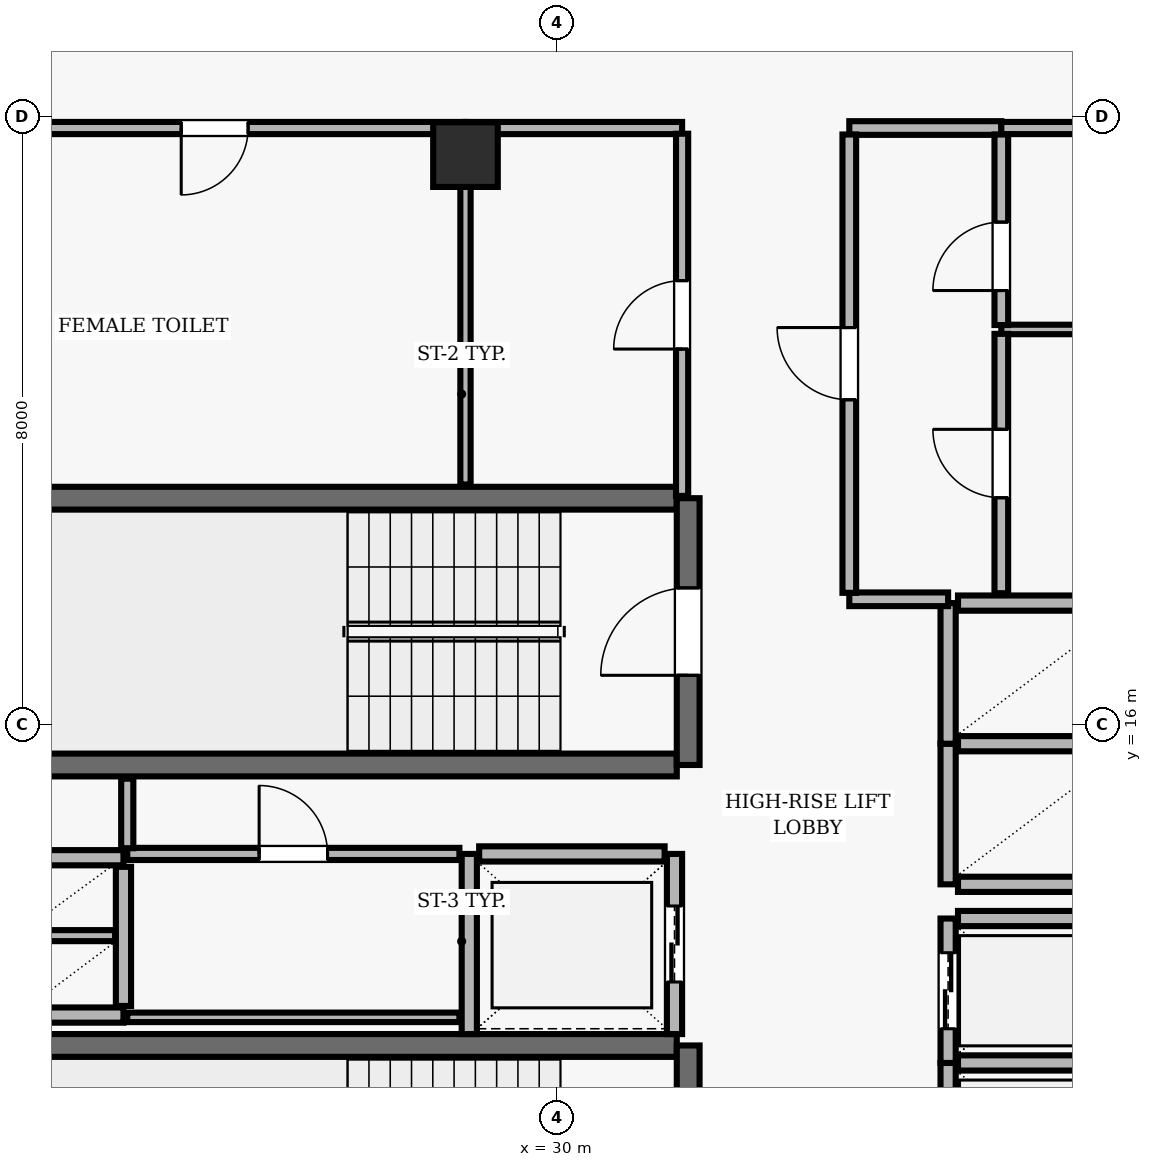
"""IFC4 building model, lengths in metres.
Left out: names, types, materials, properties, quantities, classifications, styles, units other than length and angle.
Written with IfcOpenShell. Run it as: python <this file> out.ifc"""

import sys

from ifc_helpers import new_model, si_unit, direction, frame, frame_2d, origin, origin_2d, place, context, subcontext, project, spatial, rectangle, extrude, element, fill, save


model = new_model("IFC4")
c1 = context("Model", 3, precision=1e-05, world=origin(), true_north=direction((0.0, 1.0)))
c2 = subcontext(c1, "Body", "Model", "MODEL_VIEW")
j1 = project(units=[si_unit("LENGTHUNIT", "METRE"), si_unit("PLANEANGLEUNIT", "RADIAN")], contexts=[c1])
p1 = place(None, origin())
s1 = spatial("IfcSite", under=j1, at=p1, CompositionType="ELEMENT")
p2 = place(p1, origin())
s2 = spatial("IfcBuilding", under=s1, at=p2, CompositionType="ELEMENT")
p3 = place(p2, frame((0.0, 0.0, 298.9)))
s3 = spatial("IfcBuildingStorey", under=s2, at=p3, CompositionType="ELEMENT", Elevation=298.9)
p4 = place(p3, frame((28.8, 23.5, 0.0), z_axis=(0.0, 0.0, 1.0), x_axis=(1.0, 0.0, 0.0)))
e1 = element("IfcColumn", 1, at=p4, inside=s3, PredefinedType="COLUMN", context=c2, shape_type="SweptSolid", body=[
    extrude(rectangle(XDim=0.85, YDim=0.85, at=origin_2d()), origin(), (0.0, 0.0, 1.0), 3.9),
])
for number, where, z_axis, x_axis in (
    (2, (31.58, 18.98, 0.0), (0.0, 0.0, 1.0), (-1.0, 0.0, 0.0)),
    (3, (23.22, 15.47, 0.0), (0.0, 0.0, 1.0), (1.0, 0.0, 0.0)),
):
    element("IfcWall", number, at=place(p3, frame(where, z_axis=z_axis, x_axis=x_axis)), inside=s3, PredefinedType="SHEAR", context=c2, shape_type="SweptSolid", body=[
        extrude(rectangle(XDim=8.36, YDim=0.3, at=frame_2d((4.18, 0.0))), origin(), (0.0, 0.0, 1.0), 3.69),
    ])
p5 = place(p3, frame((31.73, 15.47, 0.0), z_axis=(0.0, 0.0, 1.0), x_axis=(0.0, 1.0, 0.0)))
e4 = element("IfcWall", 4, at=p5, inside=s3, PredefinedType="SHEAR", context=c2, shape_type="SweptSolid", body=[
    extrude(rectangle(XDim=3.51, YDim=0.3, at=frame_2d((1.755, 0.0))), origin(), (0.0, 0.0, 1.0), 3.69),
])
p6 = place(p5, frame((1.18, 0.0, 0.0)))
e5 = element("IfcOpeningElement", 5, at=p6, cuts=e4, PredefinedType="OPENING", context=c2, shape_type="SweptSolid", body=[
    extrude(rectangle(XDim=1.15, YDim=2.15, at=frame_2d((0.575, 1.075))), frame((0.0, 0.16, 0.0), z_axis=(0.0, -1.0, 0.0), x_axis=(1.0, 0.0, 0.0)), (0.0, 0.0, 1.0), 0.32),
])
p7 = place(p3, frame((31.58, 11.78, 0.0), z_axis=(0.0, 0.0, 1.0), x_axis=(-1.0, 0.0, 0.0)))
e6 = element("IfcWall", 6, at=p7, inside=s3, PredefinedType="SHEAR", context=c2, shape_type="SweptSolid", body=[
    extrude(rectangle(XDim=8.36, YDim=0.3, at=frame_2d((4.18, 0.0))), origin(), (0.0, 0.0, 1.0), 3.69),
])
p8 = place(p3, frame((31.73, 8.27, 0.0), z_axis=(0.0, 0.0, 1.0), x_axis=(0.0, 1.0, 0.0)))
e7 = element("IfcWall", 7, at=p8, inside=s3, PredefinedType="SHEAR", context=c2, shape_type="SweptSolid", body=[
    extrude(rectangle(XDim=3.51, YDim=0.3, at=frame_2d((1.755, 0.0))), origin(), (0.0, 0.0, 1.0), 3.69),
])
p9 = place(p8, frame((1.18, 0.0, 0.0)))
e8 = element("IfcOpeningElement", 8, at=p9, cuts=e7, PredefinedType="OPENING", context=c2, shape_type="SweptSolid", body=[
    extrude(rectangle(XDim=1.15, YDim=2.15, at=frame_2d((0.575, 1.075))), frame((0.0, 0.16, 0.0), z_axis=(0.0, -1.0, 0.0), x_axis=(1.0, 0.0, 0.0)), (0.0, 0.0, 1.0), 0.32),
])
p10 = place(p3, frame((35.15, 11.55, 0.0), z_axis=(0.0, 0.0, 1.0), x_axis=(0.0, -1.0, 0.0)))
e9 = element("IfcWall", 9, at=p10, inside=s3, PredefinedType="SOLIDWALL", context=c2, shape_type="SweptSolid", body=[
    extrude(rectangle(XDim=1.9, YDim=0.2, at=frame_2d((0.95, 0.0))), origin(), (0.0, 0.0, 1.0), 3.69),
])
p11 = place(p10, frame((0.45, 0.0, 0.0)))
e10 = element("IfcOpeningElement", 10, at=p11, cuts=e9, PredefinedType="OPENING", context=c2, shape_type="SweptSolid", body=[
    extrude(rectangle(XDim=1.0, YDim=2.1, at=frame_2d((0.5, 1.05))), frame((0.0, 0.11, 0.0), z_axis=(0.0, -1.0, 0.0), x_axis=(1.0, 0.0, 0.0)), (0.0, 0.0, 1.0), 0.22),
])
p12 = place(p3, frame((37.42, 11.55, 0.0), z_axis=(0.0, 0.0, 1.0), x_axis=(-1.0, 0.0, 0.0)))
e11 = element("IfcWall", 11, at=p12, inside=s3, PredefinedType="SOLIDWALL", context=c2, shape_type="SweptSolid", body=[
    extrude(rectangle(XDim=2.14, YDim=0.2, at=frame_2d((1.07, 0.0))), origin(), (0.0, 0.0, 1.0), 3.69),
])
p13 = place(p3, frame((35.15, 13.45, 0.0), z_axis=(0.0, 0.0, 1.0), x_axis=(0.0, -1.0, 0.0)))
e12 = element("IfcWall", 12, at=p13, inside=s3, PredefinedType="SOLIDWALL", context=c2, shape_type="SweptSolid", body=[
    extrude(rectangle(XDim=1.9, YDim=0.2, at=frame_2d((0.95, 0.0))), origin(), (0.0, 0.0, 1.0), 3.69),
])
p14 = place(p13, frame((0.45, 0.0, 0.0)))
e13 = element("IfcOpeningElement", 13, at=p14, cuts=e12, PredefinedType="OPENING", context=c2, shape_type="SweptSolid", body=[
    extrude(rectangle(XDim=1.0, YDim=2.1, at=frame_2d((0.5, 1.05))), frame((0.0, 0.11, 0.0), z_axis=(0.0, -1.0, 0.0), x_axis=(1.0, 0.0, 0.0)), (0.0, 0.0, 1.0), 0.22),
])
p15 = place(p3, frame((37.42, 13.45, 0.0), z_axis=(0.0, 0.0, 1.0), x_axis=(-1.0, 0.0, 0.0)))
e14 = element("IfcWall", 14, at=p15, inside=s3, PredefinedType="SOLIDWALL", context=c2, shape_type="SweptSolid", body=[
    extrude(rectangle(XDim=2.14, YDim=0.2, at=frame_2d((1.07, 0.0))), origin(), (0.0, 0.0, 1.0), 3.69),
])
p16 = place(p3, frame((28.85, 14.3, 0.0), z_axis=(0.0, 0.0, 1.0), x_axis=(0.0, -1.0, 0.0)))
e15 = element("IfcWall", 15, at=p16, inside=s3, PredefinedType="SOLIDWALL", context=c2, shape_type="SweptSolid", body=[
    extrude(rectangle(XDim=2.37, YDim=0.2, at=frame_2d((1.185, 0.0))), origin(), (0.0, 0.0, 1.0), 3.69),
])
p17 = place(p3, frame((31.55, 11.93, 0.0), z_axis=(0.0, 0.0, 1.0), x_axis=(0.0, 1.0, 0.0)))
e16 = element("IfcWall", 16, at=p17, inside=s3, PredefinedType="SOLIDWALL", context=c2, shape_type="SweptSolid", body=[
    extrude(rectangle(XDim=2.37, YDim=0.2, at=frame_2d((1.185, 0.0))), origin(), (0.0, 0.0, 1.0), 3.69),
])
p18 = place(p17, frame((0.685, 0.0, 0.0)))
e17 = element("IfcOpeningElement", 17, at=p18, cuts=e16, PredefinedType="OPENING", context=c2, shape_type="SweptSolid", body=[
    extrude(rectangle(XDim=1.0, YDim=2.1, at=frame_2d((0.5, 1.05))), frame((0.0, 0.11, 0.0), z_axis=(0.0, -1.0, 0.0), x_axis=(1.0, 0.0, 0.0)), (0.0, 0.0, 1.0), 0.22),
])
p19 = place(p3, frame((31.42, 14.3, 0.0), z_axis=(0.0, 0.0, 1.0), x_axis=(-1.0, 0.0, 0.0)))
e18 = element("IfcWall", 18, at=p19, inside=s3, PredefinedType="SOLIDWALL", context=c2, shape_type="SweptSolid", body=[
    extrude(rectangle(XDim=2.44, YDim=0.2, at=frame_2d((1.22, 0.0))), origin(), (0.0, 0.0, 1.0), 3.69),
])
p20 = place(p3, frame((35.15, 15.75, 0.0), z_axis=(0.0, 0.0, 1.0), x_axis=(0.0, -1.0, 0.0)))
e19 = element("IfcWall", 19, at=p20, inside=s3, PredefinedType="SOLIDWALL", context=c2, shape_type="SweptSolid", body=[
    extrude(rectangle(XDim=1.85, YDim=0.2, at=frame_2d((0.925, 0.0))), origin(), (0.0, 0.0, 1.0), 3.69),
])
for number, where, z_axis, x_axis in (
    (20, (35.28, 13.9, 0.0), (0.0, 0.0, 1.0), (1.0, 0.0, 0.0)),
    (21, (37.42, 15.75, 0.0), (0.0, 0.0, 1.0), (-1.0, 0.0, 0.0)),
):
    element("IfcWall", number, at=place(p3, frame(where, z_axis=z_axis, x_axis=x_axis)), inside=s3, PredefinedType="SOLIDWALL", context=c2, shape_type="SweptSolid", body=[
        extrude(rectangle(XDim=2.14, YDim=0.2, at=frame_2d((1.07, 0.0))), origin(), (0.0, 0.0, 1.0), 3.69),
    ])
p21 = place(p3, frame((35.15, 17.6, 0.0), z_axis=(0.0, 0.0, 1.0), x_axis=(0.0, -1.0, 0.0)))
e22 = element("IfcWall", 22, at=p21, inside=s3, PredefinedType="SOLIDWALL", context=c2, shape_type="SweptSolid", body=[
    extrude(rectangle(XDim=1.85, YDim=0.2, at=frame_2d((0.925, 0.0))), origin(), (0.0, 0.0, 1.0), 3.69),
])
p22 = place(p3, frame((37.42, 17.6, 0.0), z_axis=(0.0, 0.0, 1.0), x_axis=(-1.0, 0.0, 0.0)))
e23 = element("IfcWall", 23, at=p22, inside=s3, PredefinedType="SOLIDWALL", context=c2, shape_type="SweptSolid", body=[
    extrude(rectangle(XDim=2.14, YDim=0.2, at=frame_2d((1.07, 0.0))), origin(), (0.0, 0.0, 1.0), 3.69),
])
for number, where, z_axis, x_axis in (
    (24, (22.9, 14.25, 0.0), (0.0, 0.0, 1.0), (1.0, 0.0, 0.0)),
    (25, (22.9, 12.18, 0.0), (0.0, 0.0, 1.0), (1.0, 0.0, 0.0)),
):
    element("IfcWall", number, at=place(p3, frame(where, z_axis=z_axis, x_axis=x_axis)), inside=s3, PredefinedType="SOLIDWALL", context=c2, shape_type="SweptSolid", body=[
        extrude(rectangle(XDim=1.4, YDim=0.2, at=frame_2d((0.7, 0.0))), origin(), (0.0, 0.0, 1.0), 3.69),
    ])
p23 = place(p3, frame((24.3, 12.3, 0.0), z_axis=(0.0, 0.0, 1.0), x_axis=(0.0, 1.0, 0.0)))
e26 = element("IfcWall", 26, at=p23, inside=s3, PredefinedType="SOLIDWALL", context=c2, shape_type="SweptSolid", body=[
    extrude(rectangle(XDim=1.83, YDim=0.2, at=frame_2d((0.915, 0.0))), origin(), (0.0, 0.0, 1.0), 3.69),
])
p24 = place(p3, frame((23.01, 13.225, 0.0), z_axis=(0.0, 0.0, 1.0), x_axis=(1.0, 0.0, 0.0)))
e27 = element("IfcWall", 27, at=p24, inside=s3, PredefinedType="PARTITIONING", context=c2, shape_type="SweptSolid", body=[
    extrude(rectangle(XDim=1.18, YDim=0.145, at=frame_2d((0.59, 0.0))), origin(), (0.0, 0.0, 1.0), 3.69),
])
p25 = place(p3, frame((24.35, 12.15, 0.0), z_axis=(0.0, 0.0, 1.0), x_axis=(1.0, 0.0, 0.0)))
e28 = element("IfcWall", 28, at=p25, inside=s3, PredefinedType="PARTITIONING", context=c2, shape_type="SweptSolid", body=[
    extrude(rectangle(XDim=4.37, YDim=0.125, at=frame_2d((2.185, 0.0))), origin(), (0.0, 0.0, 1.0), 3.69),
])
p26 = place(p3, frame((24.35, 14.3, 0.0), z_axis=(0.0, 0.0, 1.0), x_axis=(1.0, 0.0, 0.0)))
e29 = element("IfcWall", 29, at=p26, inside=s3, PredefinedType="PARTITIONING", context=c2, shape_type="SweptSolid", body=[
    extrude(rectangle(XDim=4.37, YDim=0.16, at=frame_2d((2.185, 0.0))), origin(), (0.0, 0.0, 1.0), 3.69),
])
p27 = place(p26, frame((1.735, 0.0, 0.0)))
e30 = element("IfcOpeningElement", 30, at=p27, cuts=e29, PredefinedType="OPENING", context=c2, shape_type="SweptSolid", body=[
    extrude(rectangle(XDim=0.9, YDim=2.1, at=frame_2d((0.45, 1.05))), frame((0.0, 0.09, 0.0), z_axis=(0.0, -1.0, 0.0), x_axis=(1.0, 0.0, 0.0)), (0.0, 0.0, 1.0), 0.18),
])
p28 = place(p3, frame((28.8, 23.85, 0.0), z_axis=(0.0, 0.0, 1.0), x_axis=(-1.0, 0.0, 0.0)))
e31 = element("IfcWall", 31, at=p28, inside=s3, PredefinedType="PARTITIONING", context=c2, shape_type="SweptSolid", body=[
    extrude(rectangle(XDim=6.6, YDim=0.16, at=frame_2d((3.3, 0.0))), origin(), (0.0, 0.0, 1.0), 3.227),
])
p29 = place(p28, frame((2.86, 0.0, 0.0)))
e32 = element("IfcOpeningElement", 32, at=p29, cuts=e31, PredefinedType="OPENING", context=c2, shape_type="SweptSolid", body=[
    extrude(rectangle(XDim=0.88, YDim=2.1, at=frame_2d((0.44, 1.05))), frame((0.0, 0.09, 0.0), z_axis=(0.0, -1.0, 0.0), x_axis=(1.0, 0.0, 0.0)), (0.0, 0.0, 1.0), 0.18),
])
p30 = place(p3, frame((31.65, 23.85, 0.0), z_axis=(0.0, 0.0, 1.0), x_axis=(-1.0, 0.0, 0.0)))
e33 = element("IfcWall", 33, at=p30, inside=s3, PredefinedType="PARTITIONING", context=c2, shape_type="SweptSolid", body=[
    extrude(rectangle(XDim=2.85, YDim=0.16, at=frame_2d((1.425, 0.0))), origin(), (0.0, 0.0, 1.0), 3.227),
])
p31 = place(p3, frame((33.85, 17.65, 0.0), z_axis=(0.0, 0.0, 1.0), x_axis=(1.0, 0.0, 0.0)))
e34 = element("IfcWall", 34, at=p31, inside=s3, PredefinedType="PARTITIONING", context=c2, shape_type="SweptSolid", body=[
    extrude(rectangle(XDim=1.3, YDim=0.18, at=frame_2d((0.65, 0.0))), origin(), (0.0, 0.0, 1.0), 3.69),
])
p32 = place(p3, frame((35.85, 21.2, 0.0), z_axis=(0.0, 0.0, 1.0), x_axis=(1.0, 0.0, 0.0)))
e35 = element("IfcWall", 35, at=p32, inside=s3, PredefinedType="PARTITIONING", context=c2, shape_type="SweptSolid", body=[
    extrude(rectangle(XDim=2.0, YDim=0.125, at=frame_2d((1.0, 0.0))), origin(), (0.0, 0.0, 1.0), 3.69),
])
p33 = place(p3, frame((35.85, 23.85, 0.0), z_axis=(0.0, 0.0, 1.0), x_axis=(-1.0, 0.0, 0.0)))
e36 = element("IfcWall", 36, at=p33, inside=s3, PredefinedType="PARTITIONING", context=c2, shape_type="SweptSolid", body=[
    extrude(rectangle(XDim=2.0, YDim=0.18, at=frame_2d((1.0, 0.0))), origin(), (0.0, 0.0, 1.0), 3.227),
])
p34 = place(p3, frame((37.85, 23.85, 0.0), z_axis=(0.0, 0.0, 1.0), x_axis=(-1.0, 0.0, 0.0)))
e37 = element("IfcWall", 37, at=p34, inside=s3, PredefinedType="PARTITIONING", context=c2, shape_type="SweptSolid", body=[
    extrude(rectangle(XDim=2.0, YDim=0.16, at=frame_2d((1.0, 0.0))), origin(), (0.0, 0.0, 1.0), 3.227),
])
p35 = place(p3, frame((24.35, 15.29, 0.0), z_axis=(0.0, 0.0, 1.0), x_axis=(0.0, -1.0, 0.0)))
e38 = element("IfcWall", 38, at=p35, inside=s3, PredefinedType="PARTITIONING", context=c2, shape_type="SweptSolid", body=[
    extrude(rectangle(XDim=0.915, YDim=0.16, at=frame_2d((0.458, 0.0))), origin(), (0.0, 0.0, 1.0), 3.69),
])
p36 = place(p3, frame((28.8, 23.775, 0.0), z_axis=(0.0, 0.0, 1.0), x_axis=(0.0, -1.0, 0.0)))
e39 = element("IfcWall", 39, at=p36, inside=s3, PredefinedType="PARTITIONING", context=c2, shape_type="SweptSolid", body=[
    extrude(rectangle(XDim=4.615, YDim=0.135, at=frame_2d((2.308, 0.0))), origin(), (0.0, 0.0, 1.0), 3.69),
])
p37 = place(p3, frame((31.65, 19.01, 0.0), z_axis=(0.0, 0.0, 1.0), x_axis=(0.0, 1.0, 0.0)))
e40 = element("IfcWall", 40, at=p37, inside=s3, PredefinedType="PARTITIONING", context=c2, shape_type="SweptSolid", body=[
    extrude(rectangle(XDim=4.765, YDim=0.16, at=frame_2d((2.382, 0.0))), origin(), (0.0, 0.0, 1.0), 3.69),
])
p38 = place(p37, frame((1.932, 0.0, 0.0)))
e41 = element("IfcOpeningElement", 41, at=p38, cuts=e40, PredefinedType="OPENING", context=c2, shape_type="SweptSolid", body=[
    extrude(rectangle(XDim=0.9, YDim=2.1, at=frame_2d((0.45, 1.05))), frame((0.0, 0.09, 0.0), z_axis=(0.0, -1.0, 0.0), x_axis=(1.0, 0.0, 0.0)), (0.0, 0.0, 1.0), 0.18),
])
p39 = place(p3, frame((33.85, 17.735, 0.0), z_axis=(0.0, 0.0, 1.0), x_axis=(0.0, 1.0, 0.0)))
e42 = element("IfcWall", 42, at=p39, inside=s3, PredefinedType="PARTITIONING", context=c2, shape_type="SweptSolid", body=[
    extrude(rectangle(XDim=6.03, YDim=0.18, at=frame_2d((3.015, 0.0))), origin(), (0.0, 0.0, 1.0), 3.69),
])
p40 = place(p39, frame((2.54, 0.0, 0.0)))
e43 = element("IfcOpeningElement", 43, at=p40, cuts=e42, PredefinedType="OPENING", context=c2, shape_type="SweptSolid", body=[
    extrude(rectangle(XDim=0.95, YDim=2.1, at=frame_2d((0.475, 1.05))), frame((0.0, 0.1, 0.0), z_axis=(0.0, -1.0, 0.0), x_axis=(1.0, 0.0, 0.0)), (0.0, 0.0, 1.0), 0.2),
])
p41 = place(p3, frame((35.85, 17.73, 0.0), z_axis=(0.0, 0.0, 1.0), x_axis=(0.0, 1.0, 0.0)))
e44 = element("IfcWall", 44, at=p41, inside=s3, PredefinedType="PARTITIONING", context=c2, shape_type="SweptSolid", body=[
    extrude(rectangle(XDim=3.412, YDim=0.18, at=frame_2d((1.706, 0.0))), origin(), (0.0, 0.0, 1.0), 3.69),
])
p42 = place(p41, frame((1.256, 0.0, 0.0)))
e45 = element("IfcOpeningElement", 45, at=p42, cuts=e44, PredefinedType="OPENING", context=c2, shape_type="SweptSolid", body=[
    extrude(rectangle(XDim=0.9, YDim=2.1, at=frame_2d((0.45, 1.05))), frame((0.0, 0.1, 0.0), z_axis=(0.0, -1.0, 0.0), x_axis=(1.0, 0.0, 0.0)), (0.0, 0.0, 1.0), 0.2),
])
p43 = place(p3, frame((35.85, 21.258, 0.0), z_axis=(0.0, 0.0, 1.0), x_axis=(0.0, 1.0, 0.0)))
e46 = element("IfcWall", 46, at=p43, inside=s3, PredefinedType="PARTITIONING", context=c2, shape_type="SweptSolid", body=[
    extrude(rectangle(XDim=2.507, YDim=0.18, at=frame_2d((1.253, 0.0))), origin(), (0.0, 0.0, 1.0), 3.69),
])
p44 = place(p43, frame((0.454, 0.0, 0.0)))
e47 = element("IfcOpeningElement", 47, at=p44, cuts=e46, PredefinedType="OPENING", context=c2, shape_type="SweptSolid", body=[
    extrude(rectangle(XDim=0.9, YDim=2.1, at=frame_2d((0.45, 1.05))), frame((0.0, 0.1, 0.0), z_axis=(0.0, -1.0, 0.0), x_axis=(1.0, 0.0, 0.0)), (0.0, 0.0, 1.0), 0.2),
])
p45 = place(p6, origin())
e48 = element("IfcDoor", 48, at=p45, inside=s3, OperationType="SINGLE_SWING_LEFT", PredefinedType="DOOR", context=c2, shape_type="SweptSolid", body=[
    extrude(rectangle(XDim=1.15, YDim=2.15, at=frame_2d((0.575, 1.075))), frame((0.0, 0.025, 0.0), z_axis=(0.0, -1.0, 0.0), x_axis=(1.0, 0.0, 0.0)), (0.0, 0.0, 1.0), 0.05),
])
fill(e5, e48)
p46 = place(p14, origin())
e49 = element("IfcDoor", 49, at=p46, inside=s3, OperationType="DOUBLE_DOOR_SLIDING", PredefinedType="DOOR", context=c2, shape_type="SweptSolid", body=[
    extrude(rectangle(XDim=1.0, YDim=2.1, at=frame_2d((0.5, 1.05))), frame((0.0, 0.025, 0.0), z_axis=(0.0, -1.0, 0.0), x_axis=(1.0, 0.0, 0.0)), (0.0, 0.0, 1.0), 0.05),
])
fill(e13, e49)
p47 = place(p18, origin())
e50 = element("IfcDoor", 50, at=p47, inside=s3, OperationType="DOUBLE_DOOR_SLIDING", PredefinedType="DOOR", context=c2, shape_type="SweptSolid", body=[
    extrude(rectangle(XDim=1.0, YDim=2.1, at=frame_2d((0.5, 1.05))), frame((0.0, 0.025, 0.0), z_axis=(0.0, -1.0, 0.0), x_axis=(1.0, 0.0, 0.0)), (0.0, 0.0, 1.0), 0.05),
])
fill(e17, e50)
p48 = place(p40, origin())
e51 = element("IfcDoor", 51, at=p48, inside=s3, OperationType="SINGLE_SWING_RIGHT", PredefinedType="DOOR", context=c2, shape_type="SweptSolid", body=[
    extrude(rectangle(XDim=0.95, YDim=2.1, at=frame_2d((0.475, 1.05))), frame((0.0, 0.025, 0.0), z_axis=(0.0, -1.0, 0.0), x_axis=(1.0, 0.0, 0.0)), (0.0, 0.0, 1.0), 0.05),
])
fill(e43, e51)
p49 = place(p44, origin())
e52 = element("IfcDoor", 52, at=p49, inside=s3, OperationType="SINGLE_SWING_LEFT", PredefinedType="DOOR", context=c2, shape_type="SweptSolid", body=[
    extrude(rectangle(XDim=0.9, YDim=2.1, at=frame_2d((0.45, 1.05))), frame((0.0, 0.025, 0.0), z_axis=(0.0, -1.0, 0.0), x_axis=(1.0, 0.0, 0.0)), (0.0, 0.0, 1.0), 0.05),
])
fill(e47, e52)
p50 = place(p42, origin())
e53 = element("IfcDoor", 53, at=p50, inside=s3, OperationType="SINGLE_SWING_RIGHT", PredefinedType="DOOR", context=c2, shape_type="SweptSolid", body=[
    extrude(rectangle(XDim=0.9, YDim=2.1, at=frame_2d((0.45, 1.05))), frame((0.0, 0.025, 0.0), z_axis=(0.0, -1.0, 0.0), x_axis=(1.0, 0.0, 0.0)), (0.0, 0.0, 1.0), 0.05),
])
fill(e45, e53)
p51 = place(p38, origin())
e54 = element("IfcDoor", 54, at=p51, inside=s3, OperationType="SINGLE_SWING_LEFT", PredefinedType="DOOR", context=c2, shape_type="SweptSolid", body=[
    extrude(rectangle(XDim=0.9, YDim=2.1, at=frame_2d((0.45, 1.05))), frame((0.0, 0.025, 0.0), z_axis=(0.0, -1.0, 0.0), x_axis=(1.0, 0.0, 0.0)), (0.0, 0.0, 1.0), 0.05),
])
fill(e41, e54)
p52 = place(p27, origin())
e55 = element("IfcDoor", 55, at=p52, inside=s3, OperationType="SINGLE_SWING_LEFT", PredefinedType="DOOR", context=c2, shape_type="SweptSolid", body=[
    extrude(rectangle(XDim=0.9, YDim=2.1, at=frame_2d((0.45, 1.05))), frame((0.0, 0.025, 0.0), z_axis=(0.0, -1.0, 0.0), x_axis=(1.0, 0.0, 0.0)), (0.0, 0.0, 1.0), 0.05),
])
fill(e30, e55)
p53 = place(p29, origin())
e56 = element("IfcDoor", 56, at=p53, inside=s3, OperationType="SINGLE_SWING_RIGHT", PredefinedType="DOOR", context=c2, shape_type="SweptSolid", body=[
    extrude(rectangle(XDim=0.88, YDim=2.1, at=frame_2d((0.44, 1.05))), frame((0.0, 0.025, 0.0), z_axis=(0.0, -1.0, 0.0), x_axis=(1.0, 0.0, 0.0)), (0.0, 0.0, 1.0), 0.05),
])
fill(e32, e56)
save(model, sys.argv[1])
